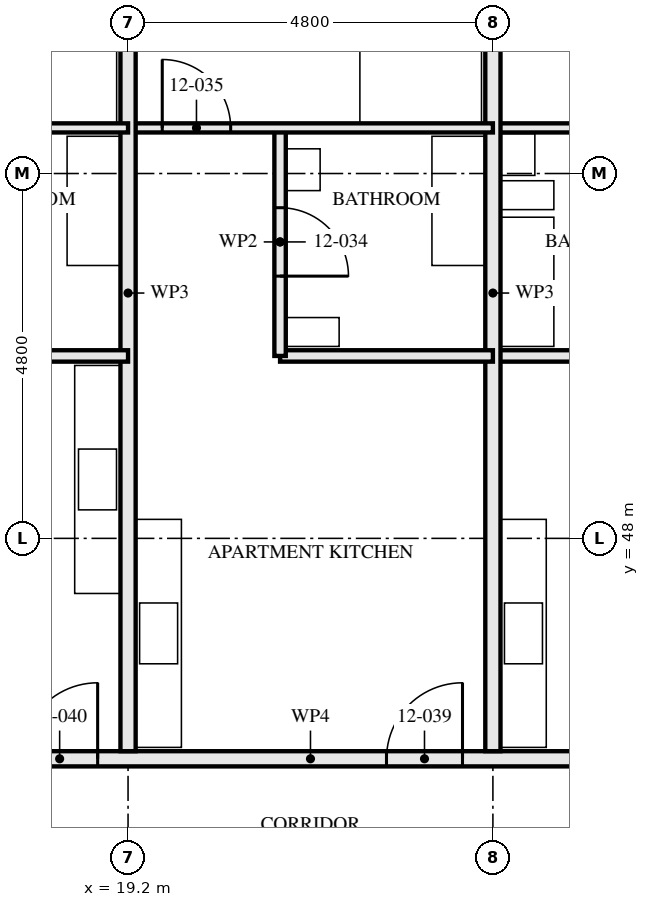
"""IFC4 building model, lengths in metres.
Left out: names, types, materials, properties, quantities, classifications, styles, units other than length and angle.
Written with IfcOpenShell. Run it as: python <this file> out.ifc"""

import sys

from ifc_helpers import new_model, si_unit, direction, frame, frame_2d, origin, place, context, subcontext, project, spatial, rectangle, extrude, element, fill, save


model = new_model("IFC4")
c1 = context("Model", 3, precision=1e-05, world=origin(), true_north=direction((0.0, 1.0)))
c2 = subcontext(c1, "Body", "Model", "MODEL_VIEW")
j1 = project(units=[si_unit("LENGTHUNIT", "METRE"), si_unit("PLANEANGLEUNIT", "RADIAN")], contexts=[c1])
p1 = place(None, origin())
s1 = spatial("IfcSite", under=j1, at=p1, CompositionType="ELEMENT")
p2 = place(p1, origin())
s2 = spatial("IfcBuilding", under=s1, at=p2, CompositionType="ELEMENT")
p3 = place(p2, frame((0.0, 0.0, 48.0)))
s3 = spatial("IfcBuildingStorey", under=s2, at=p3, CompositionType="ELEMENT", Elevation=48.0)
p4 = place(p3, frame((26.8, 50.4, 0.0), z_axis=(0.0, 0.0, 1.0), x_axis=(-1.0, 0.0, 0.0)))
e1 = element("IfcWall", 1, at=p4, inside=s3, PredefinedType="PARTITIONING", context=c2, shape_type="SweptSolid", body=[
    extrude(rectangle(XDim=2.8, YDim=0.15, at=frame_2d((1.4, 0.0))), origin(), (0.0, 0.0, 1.0), 3.33),
])
p5 = place(p3, frame((28.8, 53.4, 0.0), z_axis=(0.0, 0.0, 1.0), x_axis=(-1.0, 0.0, 0.0)))
e2 = element("IfcWall", 2, at=p5, inside=s3, PredefinedType="PARTITIONING", context=c2, shape_type="SweptSolid", body=[
    extrude(rectangle(XDim=4.8, YDim=0.12, at=frame_2d((2.4, 0.0))), origin(), (0.0, 0.0, 1.0), 3.33),
])
p6 = place(p5, frame((0.925, 0.0, 0.0)))
e3 = element("IfcOpeningElement", 3, at=p6, cuts=e2, PredefinedType="OPENING", context=c2, shape_type="SweptSolid", body=[
    extrude(rectangle(XDim=0.9, YDim=2.1, at=frame_2d((0.45, 1.05))), frame((0.0, 0.071, 0.0), z_axis=(0.0, -1.0, 0.0), x_axis=(1.0, 0.0, 0.0)), (0.0, 0.0, 1.0), 0.141),
])
p7 = place(p3, frame((24.0, 57.255, 0.0), z_axis=(0.0, 0.0, 1.0), x_axis=(0.0, -1.0, 0.0)))
e4 = element("IfcWall", 4, at=p7, inside=s3, PredefinedType="PARTITIONING", context=c2, shape_type="SweptSolid", body=[
    extrude(rectangle(XDim=12.055, YDim=0.2, at=frame_2d((6.027, 0.0))), origin(), (0.0, 0.0, 1.0), 2.55),
])
p8 = place(p3, frame((21.2, 53.4, 0.0), z_axis=(0.0, 0.0, 1.0), x_axis=(0.0, -1.0, 0.0)))
e5 = element("IfcWall", 5, at=p8, inside=s3, PredefinedType="PARTITIONING", context=c2, shape_type="SweptSolid", body=[
    extrude(rectangle(XDim=3.0, YDim=0.15, at=frame_2d((1.5, 0.0))), origin(), (0.0, 0.0, 1.0), 2.55),
])
p9 = place(p8, frame((1.05, 0.0, 0.0)))
e6 = element("IfcOpeningElement", 6, at=p9, cuts=e5, PredefinedType="OPENING", context=c2, shape_type="SweptSolid", body=[
    extrude(rectangle(XDim=0.9, YDim=2.1, at=frame_2d((0.45, 1.05))), frame((0.0, 0.085, 0.0), z_axis=(0.0, -1.0, 0.0), x_axis=(1.0, 0.0, 0.0)), (0.0, 0.0, 1.0), 0.171),
])
p10 = place(p3, frame((24.0, 50.4, 0.0), z_axis=(0.0, 0.0, 1.0), x_axis=(-1.0, 0.0, 0.0)))
e7 = element("IfcWall", 7, at=p10, inside=s3, PredefinedType="PARTITIONING", context=c2, shape_type="SweptSolid", body=[
    extrude(rectangle(XDim=2.8, YDim=0.15, at=frame_2d((1.4, 0.0))), origin(), (0.0, 0.0, 1.0), 3.33),
])
p11 = place(p3, frame((24.0, 53.4, 0.0), z_axis=(0.0, 0.0, 1.0), x_axis=(-1.0, 0.0, 0.0)))
e8 = element("IfcWall", 8, at=p11, inside=s3, PredefinedType="PARTITIONING", context=c2, shape_type="SweptSolid", body=[
    extrude(rectangle(XDim=4.8, YDim=0.12, at=frame_2d((2.4, 0.0))), origin(), (0.0, 0.0, 1.0), 3.33),
])
p12 = place(p11, frame((3.45, 0.0, 0.0)))
e9 = element("IfcOpeningElement", 9, at=p12, cuts=e8, PredefinedType="OPENING", context=c2, shape_type="SweptSolid", body=[
    extrude(rectangle(XDim=0.9, YDim=2.1, at=frame_2d((0.45, 1.05))), frame((0.0, 0.071, 0.0), z_axis=(0.0, -1.0, 0.0), x_axis=(1.0, 0.0, 0.0)), (0.0, 0.0, 1.0), 0.141),
])
p13 = place(p3, frame((19.2, 57.255, 0.0), z_axis=(0.0, 0.0, 1.0), x_axis=(0.0, -1.0, 0.0)))
e10 = element("IfcWall", 10, at=p13, inside=s3, PredefinedType="PARTITIONING", context=c2, shape_type="SweptSolid", body=[
    extrude(rectangle(XDim=12.055, YDim=0.2, at=frame_2d((6.027, 0.0))), origin(), (0.0, 0.0, 1.0), 2.55),
])
p14 = place(p3, frame((19.2, 50.4, 0.0), z_axis=(0.0, 0.0, 1.0), x_axis=(-1.0, 0.0, 0.0)))
e11 = element("IfcWall", 11, at=p14, inside=s3, PredefinedType="PARTITIONING", context=c2, shape_type="SweptSolid", body=[
    extrude(rectangle(XDim=2.8, YDim=0.15, at=frame_2d((1.4, 0.0))), origin(), (0.0, 0.0, 1.0), 3.33),
])
p15 = place(p3, frame((19.2, 53.4, 0.0), z_axis=(0.0, 0.0, 1.0), x_axis=(-1.0, 0.0, 0.0)))
e12 = element("IfcWall", 12, at=p15, inside=s3, PredefinedType="PARTITIONING", context=c2, shape_type="SweptSolid", body=[
    extrude(rectangle(XDim=4.8, YDim=0.12, at=frame_2d((2.4, 0.0))), origin(), (0.0, 0.0, 1.0), 3.33),
])
p16 = place(p15, frame((2.975, 0.0, 0.0)))
e13 = element("IfcOpeningElement", 13, at=p16, cuts=e12, PredefinedType="OPENING", context=c2, shape_type="SweptSolid", body=[
    extrude(rectangle(XDim=0.9, YDim=2.1, at=frame_2d((0.45, 1.05))), frame((0.0, 0.071, 0.0), z_axis=(0.0, -1.0, 0.0), x_axis=(1.0, 0.0, 0.0)), (0.0, 0.0, 1.0), 0.141),
])
p17 = place(p3, frame((28.8, 45.1, 0.0), z_axis=(0.0, 0.0, 1.0), x_axis=(-1.0, 0.0, 0.0)))
e14 = element("IfcWall", 14, at=p17, inside=s3, PredefinedType="PARTITIONING", context=c2, shape_type="SweptSolid", body=[
    extrude(rectangle(XDim=14.4, YDim=0.2, at=frame_2d((7.2, 0.0))), origin(), (0.0, 0.0, 1.0), 3.33),
])
p18 = place(p17, frame((0.4, 0.0, 0.0)))
e15 = element("IfcOpeningElement", 15, at=p18, cuts=e14, PredefinedType="OPENING", context=c2, shape_type="SweptSolid", body=[
    extrude(rectangle(XDim=1.0, YDim=2.1, at=frame_2d((0.5, 1.05))), frame((0.0, 0.111, 0.0), z_axis=(0.0, -1.0, 0.0), x_axis=(1.0, 0.0, 0.0)), (0.0, 0.0, 1.0), 0.221),
])
p19 = place(p17, frame((5.2, 0.0, 0.0)))
e16 = element("IfcOpeningElement", 16, at=p19, cuts=e14, PredefinedType="OPENING", context=c2, shape_type="SweptSolid", body=[
    extrude(rectangle(XDim=1.0, YDim=2.1, at=frame_2d((0.5, 1.05))), frame((0.0, 0.111, 0.0), z_axis=(0.0, -1.0, 0.0), x_axis=(1.0, 0.0, 0.0)), (0.0, 0.0, 1.0), 0.221),
])
p20 = place(p17, frame((10.0, 0.0, 0.0)))
e17 = element("IfcOpeningElement", 17, at=p20, cuts=e14, PredefinedType="OPENING", context=c2, shape_type="SweptSolid", body=[
    extrude(rectangle(XDim=1.0, YDim=2.1, at=frame_2d((0.5, 1.05))), frame((0.0, 0.111, 0.0), z_axis=(0.0, -1.0, 0.0), x_axis=(1.0, 0.0, 0.0)), (0.0, 0.0, 1.0), 0.221),
])
p21 = place(p9, origin())
e18 = element("IfcDoor", 18, at=p21, inside=s3, OperationType="SINGLE_SWING_LEFT", PredefinedType="DOOR", context=c2, shape_type="SweptSolid", body=[
    extrude(rectangle(XDim=0.9, YDim=2.1, at=frame_2d((0.45, 1.05))), frame((0.0, 0.022, 0.0), z_axis=(0.0, -1.0, 0.0), x_axis=(1.0, 0.0, 0.0)), (0.0, 0.0, 1.0), 0.044),
])
fill(e6, e18)
p22 = place(p12, frame((0.9, 0.0, 0.0), z_axis=(0.0, 0.0, 1.0), x_axis=(-1.0, 0.0, 0.0)))
e19 = element("IfcDoor", 19, at=p22, inside=s3, OperationType="SINGLE_SWING_RIGHT", PredefinedType="DOOR", context=c2, shape_type="SweptSolid", body=[
    extrude(rectangle(XDim=0.9, YDim=2.1, at=frame_2d((0.45, 1.05))), frame((0.0, 0.022, 0.0), z_axis=(0.0, -1.0, 0.0), x_axis=(1.0, 0.0, 0.0)), (0.0, 0.0, 1.0), 0.044),
])
fill(e9, e19)
p23 = place(p19, frame((1.0, 0.0, 0.0), z_axis=(0.0, 0.0, 1.0), x_axis=(-1.0, 0.0, 0.0)))
e20 = element("IfcDoor", 20, at=p23, inside=s3, OperationType="SINGLE_SWING_LEFT", PredefinedType="DOOR", context=c2, shape_type="SweptSolid", body=[
    extrude(rectangle(XDim=1.0, YDim=2.1, at=frame_2d((0.5, 1.05))), frame((0.0, 0.027, 0.0), z_axis=(0.0, -1.0, 0.0), x_axis=(1.0, 0.0, 0.0)), (0.0, 0.0, 1.0), 0.054),
])
fill(e16, e20)
p24 = place(p20, frame((1.0, 0.0, 0.0), z_axis=(0.0, 0.0, 1.0), x_axis=(-1.0, 0.0, 0.0)))
e21 = element("IfcDoor", 21, at=p24, inside=s3, OperationType="SINGLE_SWING_LEFT", PredefinedType="DOOR", context=c2, shape_type="SweptSolid", body=[
    extrude(rectangle(XDim=1.0, YDim=2.1, at=frame_2d((0.5, 1.05))), frame((0.0, 0.027, 0.0), z_axis=(0.0, -1.0, 0.0), x_axis=(1.0, 0.0, 0.0)), (0.0, 0.0, 1.0), 0.054),
])
fill(e17, e21)
save(model, sys.argv[1])
